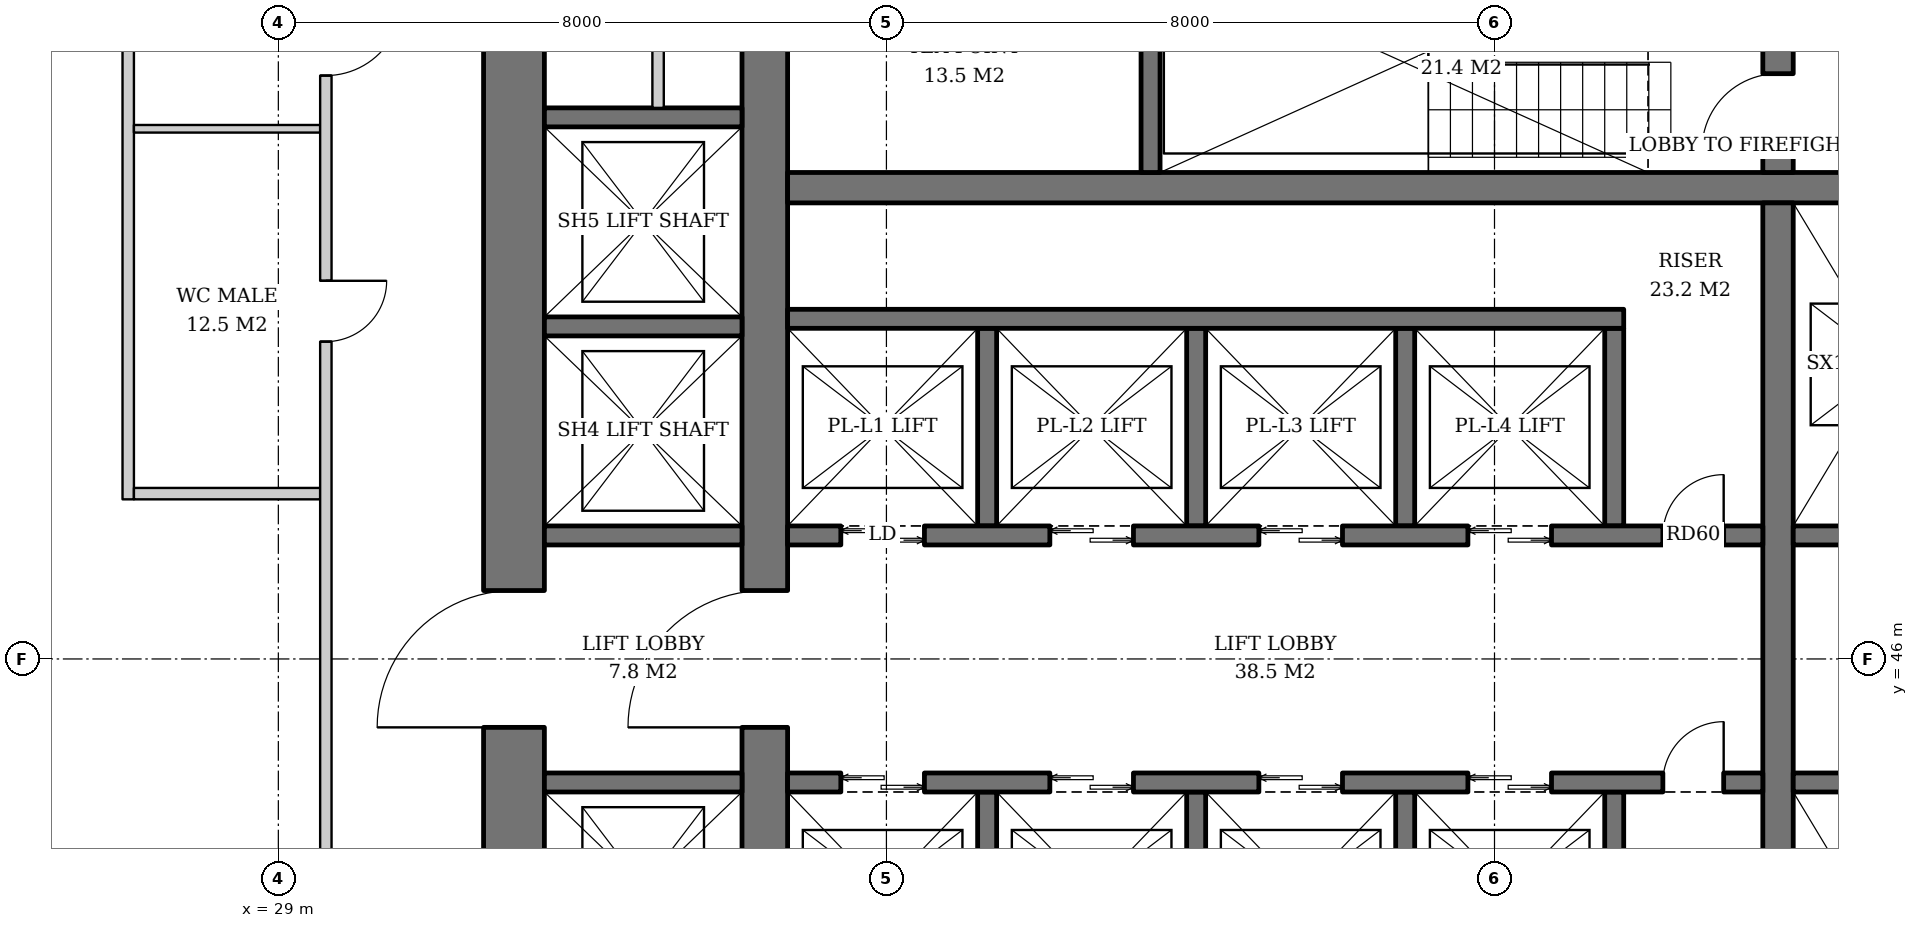
"""IFC4 building model, lengths in metres.
Left out: names, types, materials, properties, quantities, classifications, styles, units other than length and angle.
Written with IfcOpenShell. Run it as: python <this file> out.ifc"""

import sys

from ifc_helpers import new_model, si_unit, direction, frame, frame_2d, origin, place, context, subcontext, project, spatial, rectangle, extrude, element, fill, save


model = new_model("IFC4")
c1 = context("Model", 3, precision=1e-05, world=origin(), true_north=direction((0.0, 1.0)))
c2 = subcontext(c1, "Body", "Model", "MODEL_VIEW")
j1 = project(units=[si_unit("LENGTHUNIT", "METRE"), si_unit("PLANEANGLEUNIT", "RADIAN")], contexts=[c1])
p1 = place(None, origin())
s1 = spatial("IfcSite", under=j1, at=p1, CompositionType="ELEMENT")
p2 = place(p1, origin())
s2 = spatial("IfcBuilding", under=s1, at=p2, CompositionType="ELEMENT")
p3 = place(p2, frame((0.0, 0.0, 40.0)))
s3 = spatial("IfcBuildingStorey", under=s2, at=p3, CompositionType="ELEMENT", Elevation=40.0)
p4 = place(p3, frame((35.4, 36.7, 0.0), z_axis=(0.0, 0.0, 1.0), x_axis=(0.0, 1.0, 0.0)))
e1 = element("IfcWall", 1, at=p4, inside=s3, PredefinedType="SHEAR", context=c2, shape_type="SweptSolid", body=[
    extrude(rectangle(XDim=18.6, YDim=0.6, at=frame_2d((9.3, 0.0))), origin(), (0.0, 0.0, 1.0), 3.8),
])
p5 = place(p4, frame((8.4, 0.0, 0.0)))
e2 = element("IfcOpeningElement", 2, at=p5, cuts=e1, PredefinedType="OPENING", context=c2, shape_type="SweptSolid", body=[
    extrude(rectangle(XDim=1.8, YDim=2.4, at=frame_2d((0.9, 1.2))), frame((0.0, 0.31, 0.0), z_axis=(0.0, -1.0, 0.0), x_axis=(1.0, 0.0, 0.0)), (0.0, 0.0, 1.0), 0.62),
])
p6 = place(p3, frame((32.1, 33.5, 0.0), z_axis=(0.0, 0.0, 1.0), x_axis=(0.0, 1.0, 0.0)))
e3 = element("IfcWall", 3, at=p6, inside=s3, PredefinedType="SHEAR", context=c2, shape_type="SweptSolid", body=[
    extrude(rectangle(XDim=25.0, YDim=0.8, at=frame_2d((12.5, 0.0))), origin(), (0.0, 0.0, 1.0), 3.8),
])
p7 = place(p6, frame((11.6, 0.0, 0.0)))
e4 = element("IfcOpeningElement", 4, at=p7, cuts=e3, PredefinedType="OPENING", context=c2, shape_type="SweptSolid", body=[
    extrude(rectangle(XDim=1.8, YDim=2.4, at=frame_2d((0.9, 1.2))), frame((0.0, 0.41, 0.0), z_axis=(0.0, -1.0, 0.0), x_axis=(1.0, 0.0, 0.0)), (0.0, 0.0, 1.0), 0.82),
])
p8 = place(p3, frame((35.7, 52.2, 0.0), z_axis=(0.0, 0.0, 1.0), x_axis=(1.0, 0.0, 0.0)))
e5 = element("IfcWall", 5, at=p8, inside=s3, PredefinedType="SHEAR", context=c2, shape_type="SweptSolid", body=[
    extrude(rectangle(XDim=18.6, YDim=0.4, at=frame_2d((9.3, 0.0))), origin(), (0.0, 0.0, 1.0), 3.8),
])
p9 = place(p3, frame((48.73, 40.0, 0.0), z_axis=(0.0, 0.0, 1.0), x_axis=(0.0, 1.0, 0.0)))
e6 = element("IfcWall", 6, at=p9, inside=s3, PredefinedType="SHEAR", context=c2, shape_type="SweptSolid", body=[
    extrude(rectangle(XDim=12.0, YDim=0.4, at=frame_2d((6.0, 0.0))), origin(), (0.0, 0.0, 1.0), 3.8),
])
p10 = place(p3, frame((48.73, 52.4, 0.0), z_axis=(0.0, 0.0, 1.0), x_axis=(0.0, 1.0, 0.0)))
e7 = element("IfcWall", 7, at=p10, inside=s3, PredefinedType="SHEAR", context=c2, shape_type="SweptSolid", body=[
    extrude(rectangle(XDim=2.9, YDim=0.4, at=frame_2d((1.45, 0.0))), origin(), (0.0, 0.0, 1.0), 3.8),
])
p11 = place(p10, frame((0.3, 0.0, 0.0)))
e8 = element("IfcOpeningElement", 8, at=p11, cuts=e7, PredefinedType="OPENING", context=c2, shape_type="SweptSolid", body=[
    extrude(rectangle(XDim=1.0, YDim=2.1, at=frame_2d((0.5, 1.05))), frame((0.0, 0.21, 0.0), z_axis=(0.0, -1.0, 0.0), x_axis=(1.0, 0.0, 0.0)), (0.0, 0.0, 1.0), 0.42),
])
p12 = place(p3, frame((40.475, 52.4, 0.0), z_axis=(0.0, 0.0, 1.0), x_axis=(0.0, 1.0, 0.0)))
e9 = element("IfcWall", 9, at=p12, inside=s3, PredefinedType="SHEAR", context=c2, shape_type="SweptSolid", body=[
    extrude(rectangle(XDim=2.9, YDim=0.25, at=frame_2d((1.45, 0.0))), origin(), (0.0, 0.0, 1.0), 3.8),
])
for number, where, z_axis, x_axis in (
    (10, (38.325, 47.75, 0.0), (0.0, 0.0, 1.0), (0.0, 1.0, 0.0)),
    (11, (41.075, 47.75, 0.0), (0.0, 0.0, 1.0), (0.0, 1.0, 0.0)),
    (12, (43.825, 47.75, 0.0), (0.0, 0.0, 1.0), (0.0, 1.0, 0.0)),
    (13, (46.575, 47.75, 0.0), (0.0, 0.0, 1.0), (0.0, 1.0, 0.0)),
):
    element("IfcWall", number, at=place(p3, frame(where, z_axis=z_axis, x_axis=x_axis)), inside=s3, PredefinedType="SHEAR", context=c2, shape_type="SweptSolid", body=[
        extrude(rectangle(XDim=2.6, YDim=0.25, at=frame_2d((1.3, 0.0))), origin(), (0.0, 0.0, 1.0), 3.8),
    ])
p13 = place(p3, frame((35.7, 50.475, 0.0), z_axis=(0.0, 0.0, 1.0), x_axis=(1.0, 0.0, 0.0)))
e14 = element("IfcWall", 14, at=p13, inside=s3, PredefinedType="SHEAR", context=c2, shape_type="SweptSolid", body=[
    extrude(rectangle(XDim=11.0, YDim=0.25, at=frame_2d((5.5, 0.0))), origin(), (0.0, 0.0, 1.0), 3.8),
])
p14 = place(p3, frame((35.7, 47.625, 0.0), z_axis=(0.0, 0.0, 1.0), x_axis=(1.0, 0.0, 0.0)))
e15 = element("IfcWall", 15, at=p14, inside=s3, PredefinedType="SHEAR", context=c2, shape_type="SweptSolid", body=[
    extrude(rectangle(XDim=12.83, YDim=0.25, at=frame_2d((6.415, 0.0))), origin(), (0.0, 0.0, 1.0), 3.8),
])
p15 = place(p14, frame((0.7, 0.0, 0.0)))
e16 = element("IfcOpeningElement", 16, at=p15, cuts=e15, PredefinedType="OPENING", context=c2, shape_type="SweptSolid", body=[
    extrude(rectangle(XDim=1.1, YDim=2.2, at=frame_2d((0.55, 1.1))), frame((0.0, 0.135, 0.0), z_axis=(0.0, -1.0, 0.0), x_axis=(1.0, 0.0, 0.0)), (0.0, 0.0, 1.0), 0.27),
])
p16 = place(p14, frame((3.45, 0.0, 0.0)))
e17 = element("IfcOpeningElement", 17, at=p16, cuts=e15, PredefinedType="OPENING", context=c2, shape_type="SweptSolid", body=[
    extrude(rectangle(XDim=1.1, YDim=2.2, at=frame_2d((0.55, 1.1))), frame((0.0, 0.135, 0.0), z_axis=(0.0, -1.0, 0.0), x_axis=(1.0, 0.0, 0.0)), (0.0, 0.0, 1.0), 0.27),
])
p17 = place(p14, frame((6.2, 0.0, 0.0)))
e18 = element("IfcOpeningElement", 18, at=p17, cuts=e15, PredefinedType="OPENING", context=c2, shape_type="SweptSolid", body=[
    extrude(rectangle(XDim=1.1, YDim=2.2, at=frame_2d((0.55, 1.1))), frame((0.0, 0.135, 0.0), z_axis=(0.0, -1.0, 0.0), x_axis=(1.0, 0.0, 0.0)), (0.0, 0.0, 1.0), 0.27),
])
p18 = place(p14, frame((8.95, 0.0, 0.0)))
e19 = element("IfcOpeningElement", 19, at=p18, cuts=e15, PredefinedType="OPENING", context=c2, shape_type="SweptSolid", body=[
    extrude(rectangle(XDim=1.1, YDim=2.2, at=frame_2d((0.55, 1.1))), frame((0.0, 0.135, 0.0), z_axis=(0.0, -1.0, 0.0), x_axis=(1.0, 0.0, 0.0)), (0.0, 0.0, 1.0), 0.27),
])
p19 = place(p14, frame((11.515, 0.0, 0.0)))
e20 = element("IfcOpeningElement", 20, at=p19, cuts=e15, PredefinedType="OPENING", context=c2, shape_type="SweptSolid", body=[
    extrude(rectangle(XDim=0.8, YDim=2.0, at=frame_2d((0.4, 1.0))), frame((0.0, 0.135, 0.0), z_axis=(0.0, -1.0, 0.0), x_axis=(1.0, 0.0, 0.0)), (0.0, 0.0, 1.0), 0.27),
])
for number, where, z_axis, x_axis in (
    (21, (38.325, 44.25, 0.0), (0.0, 0.0, 1.0), (0.0, -1.0, 0.0)),
    (22, (41.075, 44.25, 0.0), (0.0, 0.0, 1.0), (0.0, -1.0, 0.0)),
    (23, (43.825, 44.25, 0.0), (0.0, 0.0, 1.0), (0.0, -1.0, 0.0)),
    (24, (46.575, 44.25, 0.0), (0.0, 0.0, 1.0), (0.0, -1.0, 0.0)),
):
    element("IfcWall", number, at=place(p3, frame(where, z_axis=z_axis, x_axis=x_axis)), inside=s3, PredefinedType="SHEAR", context=c2, shape_type="SweptSolid", body=[
        extrude(rectangle(XDim=2.6, YDim=0.25, at=frame_2d((1.3, 0.0))), origin(), (0.0, 0.0, 1.0), 3.8),
    ])
p20 = place(p3, frame((35.7, 44.375, 0.0), z_axis=(0.0, 0.0, 1.0), x_axis=(1.0, 0.0, 0.0)))
e25 = element("IfcWall", 25, at=p20, inside=s3, PredefinedType="SHEAR", context=c2, shape_type="SweptSolid", body=[
    extrude(rectangle(XDim=12.83, YDim=0.25, at=frame_2d((6.415, 0.0))), origin(), (0.0, 0.0, 1.0), 3.8),
])
p21 = place(p20, frame((0.7, 0.0, 0.0)))
e26 = element("IfcOpeningElement", 26, at=p21, cuts=e25, PredefinedType="OPENING", context=c2, shape_type="SweptSolid", body=[
    extrude(rectangle(XDim=1.1, YDim=2.2, at=frame_2d((0.55, 1.1))), frame((0.0, 0.135, 0.0), z_axis=(0.0, -1.0, 0.0), x_axis=(1.0, 0.0, 0.0)), (0.0, 0.0, 1.0), 0.27),
])
p22 = place(p20, frame((3.45, 0.0, 0.0)))
e27 = element("IfcOpeningElement", 27, at=p22, cuts=e25, PredefinedType="OPENING", context=c2, shape_type="SweptSolid", body=[
    extrude(rectangle(XDim=1.1, YDim=2.2, at=frame_2d((0.55, 1.1))), frame((0.0, 0.135, 0.0), z_axis=(0.0, -1.0, 0.0), x_axis=(1.0, 0.0, 0.0)), (0.0, 0.0, 1.0), 0.27),
])
p23 = place(p20, frame((6.2, 0.0, 0.0)))
e28 = element("IfcOpeningElement", 28, at=p23, cuts=e25, PredefinedType="OPENING", context=c2, shape_type="SweptSolid", body=[
    extrude(rectangle(XDim=1.1, YDim=2.2, at=frame_2d((0.55, 1.1))), frame((0.0, 0.135, 0.0), z_axis=(0.0, -1.0, 0.0), x_axis=(1.0, 0.0, 0.0)), (0.0, 0.0, 1.0), 0.27),
])
p24 = place(p20, frame((8.95, 0.0, 0.0)))
e29 = element("IfcOpeningElement", 29, at=p24, cuts=e25, PredefinedType="OPENING", context=c2, shape_type="SweptSolid", body=[
    extrude(rectangle(XDim=1.1, YDim=2.2, at=frame_2d((0.55, 1.1))), frame((0.0, 0.135, 0.0), z_axis=(0.0, -1.0, 0.0), x_axis=(1.0, 0.0, 0.0)), (0.0, 0.0, 1.0), 0.27),
])
p25 = place(p20, frame((11.515, 0.0, 0.0)))
e30 = element("IfcOpeningElement", 30, at=p25, cuts=e25, PredefinedType="OPENING", context=c2, shape_type="SweptSolid", body=[
    extrude(rectangle(XDim=0.8, YDim=2.0, at=frame_2d((0.4, 1.0))), frame((0.0, 0.135, 0.0), z_axis=(0.0, -1.0, 0.0), x_axis=(1.0, 0.0, 0.0)), (0.0, 0.0, 1.0), 0.27),
])
for number, where, z_axis, x_axis in (
    (31, (48.93, 47.625, 0.0), (0.0, 0.0, 1.0), (1.0, 0.0, 0.0)),
    (32, (48.93, 44.375, 0.0), (0.0, 0.0, 1.0), (1.0, 0.0, 0.0)),
):
    element("IfcWall", number, at=place(p3, frame(where, z_axis=z_axis, x_axis=x_axis)), inside=s3, PredefinedType="SHEAR", context=c2, shape_type="SweptSolid", body=[
        extrude(rectangle(XDim=5.37, YDim=0.25, at=frame_2d((2.685, 0.0))), origin(), (0.0, 0.0, 1.0), 3.8),
    ])
for number, where, z_axis, x_axis in (
    (33, (32.5, 44.375, 0.0), (0.0, 0.0, 1.0), (1.0, 0.0, 0.0)),
    (34, (32.5, 47.625, 0.0), (0.0, 0.0, 1.0), (1.0, 0.0, 0.0)),
    (35, (32.5, 50.375, 0.0), (0.0, 0.0, 1.0), (1.0, 0.0, 0.0)),
    (36, (32.5, 53.125, 0.0), (0.0, 0.0, 1.0), (1.0, 0.0, 0.0)),
):
    element("IfcWall", number, at=place(p3, frame(where, z_axis=z_axis, x_axis=x_axis)), inside=s3, PredefinedType="SHEAR", context=c2, shape_type="SweptSolid", body=[
        extrude(rectangle(XDim=2.6, YDim=0.25, at=frame_2d((1.3, 0.0))), origin(), (0.0, 0.0, 1.0), 3.8),
    ])
p26 = place(p3, frame((33.996, 53.25, 0.0), z_axis=(0.0, 0.0, 1.0), x_axis=(0.0, 1.0, 0.0)))
e37 = element("IfcWall", 37, at=p26, inside=s3, PredefinedType="SOLIDWALL", context=c2, shape_type="SweptSolid", body=[
    extrude(rectangle(XDim=5.25, YDim=0.15, at=frame_2d((2.625, 0.0))), origin(), (0.0, 0.0, 1.0), 3.62),
])
p27 = place(p3, frame((27.025, 60.25, 0.0), z_axis=(0.0, 0.0, 1.0), x_axis=(0.0, -1.0, 0.0)))
e38 = element("IfcWall", 38, at=p27, inside=s3, PredefinedType="PARTITIONING", context=c2, shape_type="SweptSolid", body=[
    extrude(rectangle(XDim=12.15, YDim=0.15, at=frame_2d((6.075, 0.0))), origin(), (0.0, 0.0, 1.0), 2.612),
])
p28 = place(p3, frame((29.55, 52.975, 0.0), z_axis=(0.0, 0.0, 1.0), x_axis=(-1.0, 0.0, 0.0)))
e39 = element("IfcWall", 39, at=p28, inside=s3, PredefinedType="SOLIDWALL", context=c2, shape_type="SweptSolid", body=[
    extrude(rectangle(XDim=2.45, YDim=0.1, at=frame_2d((1.225, 0.0))), origin(), (0.0, 0.0, 1.0), 3.62),
])
p29 = place(p3, frame((29.55, 48.175, 0.0), z_axis=(0.0, 0.0, 1.0), x_axis=(-1.0, 0.0, 0.0)))
e40 = element("IfcWall", 40, at=p29, inside=s3, PredefinedType="PARTITIONING", context=c2, shape_type="SweptSolid", body=[
    extrude(rectangle(XDim=2.45, YDim=0.15, at=frame_2d((1.225, 0.0))), origin(), (0.0, 0.0, 1.0), 3.62),
])
p30 = place(p3, frame((29.625, 61.45, 0.0), z_axis=(0.0, 0.0, 1.0), x_axis=(0.0, -1.0, 0.0)))
e41 = element("IfcWall", 41, at=p30, inside=s3, PredefinedType="PARTITIONING", context=c2, shape_type="SweptSolid", body=[
    extrude(rectangle(XDim=30.75, YDim=0.15, at=frame_2d((15.375, 0.0))), origin(), (0.0, 0.0, 1.0), 2.612),
])
p31 = place(p30, frame((3.275, 0.0, 0.0)))
e42 = element("IfcOpeningElement", 42, at=p31, cuts=e41, PredefinedType="OPENING", context=c2, shape_type="SweptSolid", body=[
    extrude(rectangle(XDim=0.8, YDim=2.1, at=frame_2d((0.4, 1.05))), frame((0.0, 0.085, 0.0), z_axis=(0.0, -1.0, 0.0), x_axis=(1.0, 0.0, 0.0)), (0.0, 0.0, 1.0), 0.17),
])
p32 = place(p30, frame((6.775, 0.0, 0.0)))
e43 = element("IfcOpeningElement", 43, at=p32, cuts=e41, PredefinedType="OPENING", context=c2, shape_type="SweptSolid", body=[
    extrude(rectangle(XDim=1.0, YDim=2.1, at=frame_2d((0.5, 1.05))), frame((0.0, 0.085, 0.0), z_axis=(0.0, -1.0, 0.0), x_axis=(1.0, 0.0, 0.0)), (0.0, 0.0, 1.0), 0.17),
])
p33 = place(p30, frame((10.475, 0.0, 0.0)))
e44 = element("IfcOpeningElement", 44, at=p33, cuts=e41, PredefinedType="OPENING", context=c2, shape_type="SweptSolid", body=[
    extrude(rectangle(XDim=0.8, YDim=2.1, at=frame_2d((0.4, 1.05))), frame((0.0, 0.085, 0.0), z_axis=(0.0, -1.0, 0.0), x_axis=(1.0, 0.0, 0.0)), (0.0, 0.0, 1.0), 0.17),
])
p34 = place(p15, origin())
e45 = element("IfcDoor", 45, at=p34, inside=s3, OperationType="DOUBLE_DOOR_SLIDING", PredefinedType="DOOR", context=c2, shape_type="SweptSolid", body=[
    extrude(rectangle(XDim=1.1, YDim=2.2, at=frame_2d((0.55, 1.1))), frame((0.0, 0.025, 0.0), z_axis=(0.0, -1.0, 0.0), x_axis=(1.0, 0.0, 0.0)), (0.0, 0.0, 1.0), 0.05),
])
fill(e16, e45)
p35 = place(p16, origin())
e46 = element("IfcDoor", 46, at=p35, inside=s3, OperationType="DOUBLE_DOOR_SLIDING", PredefinedType="DOOR", context=c2, shape_type="SweptSolid", body=[
    extrude(rectangle(XDim=1.1, YDim=2.2, at=frame_2d((0.55, 1.1))), frame((0.0, 0.025, 0.0), z_axis=(0.0, -1.0, 0.0), x_axis=(1.0, 0.0, 0.0)), (0.0, 0.0, 1.0), 0.05),
])
fill(e17, e46)
p36 = place(p17, origin())
e47 = element("IfcDoor", 47, at=p36, inside=s3, OperationType="DOUBLE_DOOR_SLIDING", PredefinedType="DOOR", context=c2, shape_type="SweptSolid", body=[
    extrude(rectangle(XDim=1.1, YDim=2.2, at=frame_2d((0.55, 1.1))), frame((0.0, 0.025, 0.0), z_axis=(0.0, -1.0, 0.0), x_axis=(1.0, 0.0, 0.0)), (0.0, 0.0, 1.0), 0.05),
])
fill(e18, e47)
p37 = place(p18, origin())
e48 = element("IfcDoor", 48, at=p37, inside=s3, OperationType="DOUBLE_DOOR_SLIDING", PredefinedType="DOOR", context=c2, shape_type="SweptSolid", body=[
    extrude(rectangle(XDim=1.1, YDim=2.2, at=frame_2d((0.55, 1.1))), frame((0.0, 0.025, 0.0), z_axis=(0.0, -1.0, 0.0), x_axis=(1.0, 0.0, 0.0)), (0.0, 0.0, 1.0), 0.05),
])
fill(e19, e48)
p38 = place(p19, origin())
e49 = element("IfcDoor", 49, at=p38, inside=s3, OperationType="SINGLE_SWING_RIGHT", PredefinedType="DOOR", context=c2, shape_type="SweptSolid", body=[
    extrude(rectangle(XDim=0.8, YDim=2.0, at=frame_2d((0.4, 1.0))), frame((0.0, 0.025, 0.0), z_axis=(0.0, -1.0, 0.0), x_axis=(1.0, 0.0, 0.0)), (0.0, 0.0, 1.0), 0.05),
])
fill(e20, e49)
p39 = place(p21, origin())
e50 = element("IfcDoor", 50, at=p39, inside=s3, OperationType="DOUBLE_DOOR_SLIDING", PredefinedType="DOOR", context=c2, shape_type="SweptSolid", body=[
    extrude(rectangle(XDim=1.1, YDim=2.2, at=frame_2d((0.55, 1.1))), frame((0.0, 0.025, 0.0), z_axis=(0.0, -1.0, 0.0), x_axis=(1.0, 0.0, 0.0)), (0.0, 0.0, 1.0), 0.05),
])
fill(e26, e50)
p40 = place(p22, origin())
e51 = element("IfcDoor", 51, at=p40, inside=s3, OperationType="DOUBLE_DOOR_SLIDING", PredefinedType="DOOR", context=c2, shape_type="SweptSolid", body=[
    extrude(rectangle(XDim=1.1, YDim=2.2, at=frame_2d((0.55, 1.1))), frame((0.0, 0.025, 0.0), z_axis=(0.0, -1.0, 0.0), x_axis=(1.0, 0.0, 0.0)), (0.0, 0.0, 1.0), 0.05),
])
fill(e27, e51)
p41 = place(p23, origin())
e52 = element("IfcDoor", 52, at=p41, inside=s3, OperationType="DOUBLE_DOOR_SLIDING", PredefinedType="DOOR", context=c2, shape_type="SweptSolid", body=[
    extrude(rectangle(XDim=1.1, YDim=2.2, at=frame_2d((0.55, 1.1))), frame((0.0, 0.025, 0.0), z_axis=(0.0, -1.0, 0.0), x_axis=(1.0, 0.0, 0.0)), (0.0, 0.0, 1.0), 0.05),
])
fill(e28, e52)
p42 = place(p24, origin())
e53 = element("IfcDoor", 53, at=p42, inside=s3, OperationType="DOUBLE_DOOR_SLIDING", PredefinedType="DOOR", context=c2, shape_type="SweptSolid", body=[
    extrude(rectangle(XDim=1.1, YDim=2.2, at=frame_2d((0.55, 1.1))), frame((0.0, 0.025, 0.0), z_axis=(0.0, -1.0, 0.0), x_axis=(1.0, 0.0, 0.0)), (0.0, 0.0, 1.0), 0.05),
])
fill(e29, e53)
p43 = place(p25, origin())
e54 = element("IfcDoor", 54, at=p43, inside=s3, OperationType="SINGLE_SWING_RIGHT", PredefinedType="DOOR", context=c2, shape_type="SweptSolid", body=[
    extrude(rectangle(XDim=0.8, YDim=2.0, at=frame_2d((0.4, 1.0))), frame((0.0, 0.025, 0.0), z_axis=(0.0, -1.0, 0.0), x_axis=(1.0, 0.0, 0.0)), (0.0, 0.0, 1.0), 0.05),
])
fill(e30, e54)
p44 = place(p11, origin())
e55 = element("IfcDoor", 55, at=p44, inside=s3, OperationType="SINGLE_SWING_LEFT", PredefinedType="DOOR", context=c2, shape_type="SweptSolid", body=[
    extrude(rectangle(XDim=1.0, YDim=2.1, at=frame_2d((0.5, 1.05))), frame((0.0, 0.025, 0.0), z_axis=(0.0, -1.0, 0.0), x_axis=(1.0, 0.0, 0.0)), (0.0, 0.0, 1.0), 0.05),
])
fill(e8, e55)
p45 = place(p5, origin())
e56 = element("IfcDoor", 56, at=p45, inside=s3, OperationType="DOUBLE_DOOR_SINGLE_SWING", PredefinedType="DOOR", context=c2, shape_type="SweptSolid", body=[
    extrude(rectangle(XDim=1.8, YDim=2.4, at=frame_2d((0.9, 1.2))), frame((0.0, 0.025, 0.0), z_axis=(0.0, -1.0, 0.0), x_axis=(1.0, 0.0, 0.0)), (0.0, 0.0, 1.0), 0.05),
])
fill(e2, e56)
p46 = place(p7, origin())
e57 = element("IfcDoor", 57, at=p46, inside=s3, OperationType="DOUBLE_DOOR_SINGLE_SWING", PredefinedType="DOOR", context=c2, shape_type="SweptSolid", body=[
    extrude(rectangle(XDim=1.8, YDim=2.4, at=frame_2d((0.9, 1.2))), frame((0.0, 0.025, 0.0), z_axis=(0.0, -1.0, 0.0), x_axis=(1.0, 0.0, 0.0)), (0.0, 0.0, 1.0), 0.05),
])
fill(e4, e57)
p47 = place(p32, origin())
e58 = element("IfcDoor", 58, at=p47, inside=s3, OperationType="SINGLE_SWING_LEFT", PredefinedType="DOOR", context=c2, shape_type="SweptSolid", body=[
    extrude(rectangle(XDim=1.0, YDim=2.1, at=frame_2d((0.5, 1.05))), frame((0.0, 0.025, 0.0), z_axis=(0.0, -1.0, 0.0), x_axis=(1.0, 0.0, 0.0)), (0.0, 0.0, 1.0), 0.05),
])
fill(e43, e58)
p48 = place(p33, origin())
e59 = element("IfcDoor", 59, at=p48, inside=s3, OperationType="SINGLE_SWING_LEFT", PredefinedType="DOOR", context=c2, shape_type="SweptSolid", body=[
    extrude(rectangle(XDim=0.8, YDim=2.1, at=frame_2d((0.4, 1.05))), frame((0.0, 0.025, 0.0), z_axis=(0.0, -1.0, 0.0), x_axis=(1.0, 0.0, 0.0)), (0.0, 0.0, 1.0), 0.05),
])
fill(e44, e59)
save(model, sys.argv[1])
